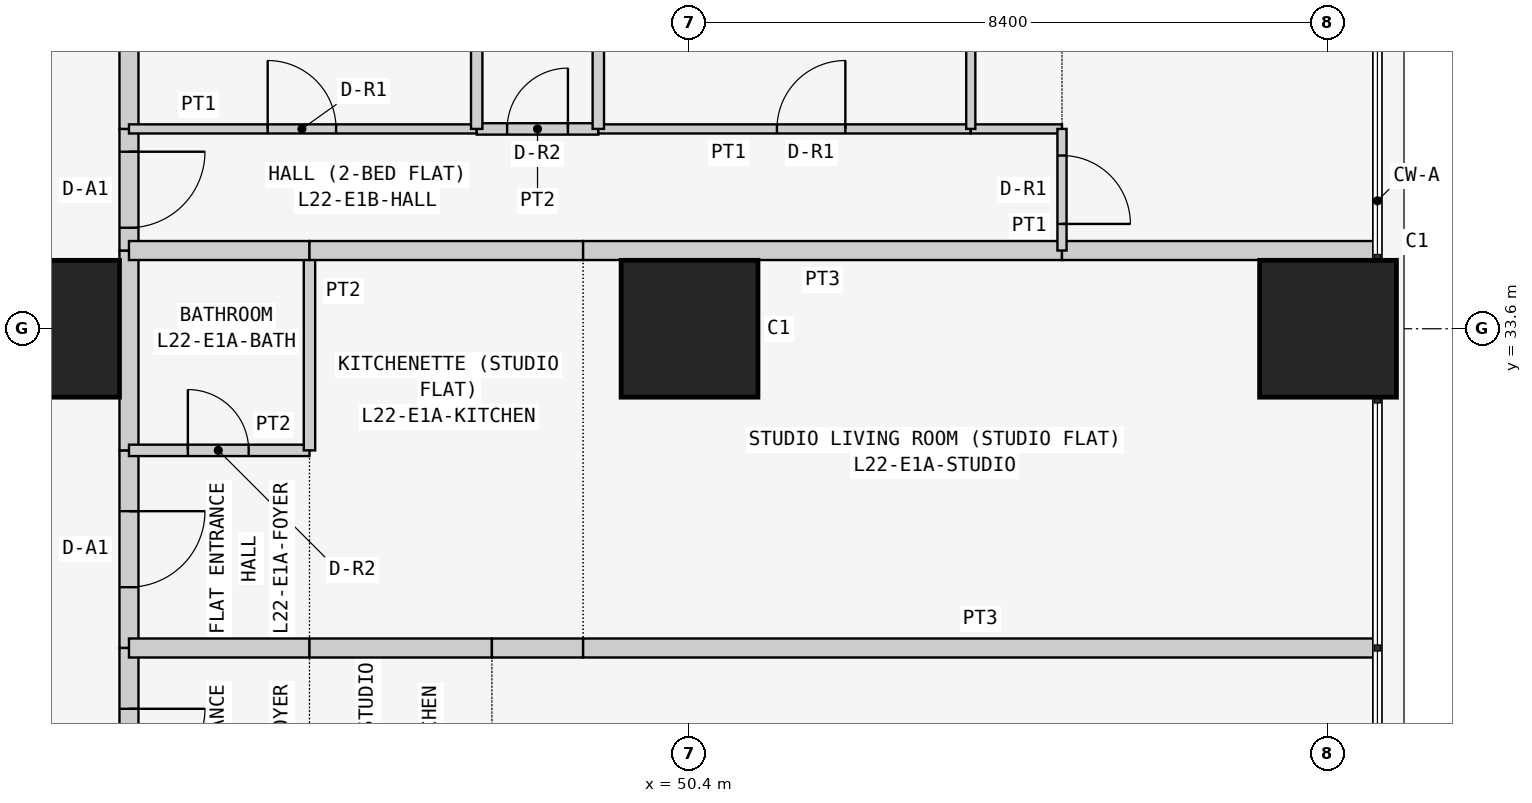
"""IFC4 building model, lengths in metres.
Left out: names, types, materials, properties, quantities, classifications, styles, units other than length and angle.
Written with IfcOpenShell. Run it as: python <this file> out.ifc"""

import sys

from ifc_helpers import new_model, si_unit, direction, frame, frame_2d, origin, origin_2d, place, context, subcontext, project, spatial, rectangle, extrude, element, fill, save


model = new_model("IFC4")
c1 = context("Model", 3, precision=1e-05, world=origin(), true_north=direction((0.0, 1.0)))
c2 = subcontext(c1, "Body", "Model", "MODEL_VIEW")
j1 = project(units=[si_unit("LENGTHUNIT", "METRE"), si_unit("PLANEANGLEUNIT", "RADIAN")], contexts=[c1])
p1 = place(None, origin())
s1 = spatial("IfcSite", under=j1, at=p1, CompositionType="ELEMENT")
p2 = place(p1, origin())
s2 = spatial("IfcBuilding", under=s1, at=p2, CompositionType="ELEMENT")
p3 = place(p2, frame((0.0, 0.0, 88.5)))
s3 = spatial("IfcBuildingStorey", under=s2, at=p3, CompositionType="ELEMENT", Elevation=88.5)
for number, where, z_axis, x_axis in (
    (1, (42.0, 33.6, 0.0), (0.0, 0.0, 1.0), (1.0, 0.0, 0.0)),
    (2, (50.4, 33.6, 0.0), (0.0, 0.0, 1.0), (1.0, 0.0, 0.0)),
    (3, (58.8, 33.6, 0.0), (0.0, 0.0, 1.0), (1.0, 0.0, 0.0)),
):
    element("IfcColumn", number, at=place(p3, frame(where, z_axis=z_axis, x_axis=x_axis)), inside=s3, PredefinedType="COLUMN", context=c2, shape_type="SweptSolid", body=[
        extrude(rectangle(XDim=1.8, YDim=1.8, at=origin_2d()), origin(), (0.0, 0.0, 1.0), 3.6),
    ])
p4 = place(p3, frame((43.025, 32.0, 0.0), z_axis=(0.0, 0.0, 1.0), x_axis=(0.0, -1.0, 0.0)))
e4 = element("IfcWall", 4, at=p4, inside=s3, PredefinedType="PARTITIONING", context=c2, shape_type="SweptSolid", body=[
    extrude(rectangle(XDim=2.6, YDim=0.25, at=frame_2d((1.3, 0.0))), origin(), (0.0, 0.0, 1.0), 3.45),
])
p5 = place(p4, frame((0.8, 0.0, 0.0)))
e5 = element("IfcOpeningElement", 5, at=p5, cuts=e4, PredefinedType="OPENING", context=c2, shape_type="SweptSolid", body=[
    extrude(rectangle(XDim=1.0, YDim=2.1, at=frame_2d((0.5, 1.05))), frame((0.0, 0.135, 0.0), z_axis=(0.0, -1.0, 0.0), x_axis=(1.0, 0.0, 0.0)), (0.0, 0.0, 1.0), 0.27),
])
p6 = place(p3, frame((43.025, 34.629, 0.0), z_axis=(0.0, 0.0, 1.0), x_axis=(0.0, -1.0, 0.0)))
e6 = element("IfcWall", 6, at=p6, inside=s3, PredefinedType="PARTITIONING", context=c2, shape_type="SweptSolid", body=[
    extrude(rectangle(XDim=2.629, YDim=0.25, at=frame_2d((1.314, 0.0))), origin(), (0.0, 0.0, 1.0), 3.45),
])
p7 = place(p3, frame((43.025, 36.229, 0.0), z_axis=(0.0, 0.0, 1.0), x_axis=(0.0, -1.0, 0.0)))
e7 = element("IfcWall", 7, at=p7, inside=s3, PredefinedType="PARTITIONING", context=c2, shape_type="SweptSolid", body=[
    extrude(rectangle(XDim=1.6, YDim=0.25, at=frame_2d((0.8, 0.0))), origin(), (0.0, 0.0, 1.0), 3.45),
])
p8 = place(p7, frame((0.3, 0.0, 0.0)))
e8 = element("IfcOpeningElement", 8, at=p8, cuts=e7, PredefinedType="OPENING", context=c2, shape_type="SweptSolid", body=[
    extrude(rectangle(XDim=1.0, YDim=2.1, at=frame_2d((0.5, 1.05))), frame((0.0, 0.135, 0.0), z_axis=(0.0, -1.0, 0.0), x_axis=(1.0, 0.0, 0.0)), (0.0, 0.0, 1.0), 0.27),
])
p9 = place(p3, frame((43.025, 42.7, 0.0), z_axis=(0.0, 0.0, 1.0), x_axis=(0.0, -1.0, 0.0)))
e9 = element("IfcWall", 9, at=p9, inside=s3, PredefinedType="PARTITIONING", context=c2, shape_type="SweptSolid", body=[
    extrude(rectangle(XDim=6.471, YDim=0.25, at=frame_2d((3.235, 0.0))), origin(), (0.0, 0.0, 1.0), 3.45),
])
p10 = place(p3, frame((43.025, 29.4, 0.0), z_axis=(0.0, 0.0, 1.0), x_axis=(0.0, -1.0, 0.0)))
e10 = element("IfcWall", 10, at=p10, inside=s3, PredefinedType="PARTITIONING", context=c2, shape_type="SweptSolid", body=[
    extrude(rectangle(XDim=2.6, YDim=0.25, at=frame_2d((1.3, 0.0))), origin(), (0.0, 0.0, 1.0), 3.45),
])
p11 = place(p10, frame((0.8, 0.0, 0.0)))
e11 = element("IfcOpeningElement", 11, at=p11, cuts=e10, PredefinedType="OPENING", context=c2, shape_type="SweptSolid", body=[
    extrude(rectangle(XDim=1.0, YDim=2.1, at=frame_2d((0.5, 1.05))), frame((0.0, 0.135, 0.0), z_axis=(0.0, -1.0, 0.0), x_axis=(1.0, 0.0, 0.0)), (0.0, 0.0, 1.0), 0.27),
])
p12 = place(p3, frame((45.4, 32.0, 0.0), z_axis=(0.0, 0.0, 1.0), x_axis=(-1.0, 0.0, 0.0)))
e12 = element("IfcWall", 12, at=p12, inside=s3, PredefinedType="PARTITIONING", context=c2, shape_type="SweptSolid", body=[
    extrude(rectangle(XDim=2.375, YDim=0.15, at=frame_2d((1.188, 0.0))), origin(), (0.0, 0.0, 1.0), 3.45),
])
p13 = place(p12, frame((0.8, 0.0, 0.0)))
e13 = element("IfcOpeningElement", 13, at=p13, cuts=e12, PredefinedType="OPENING", context=c2, shape_type="SweptSolid", body=[
    extrude(rectangle(XDim=0.8, YDim=2.1, at=frame_2d((0.4, 1.05))), frame((0.0, 0.085, 0.0), z_axis=(0.0, -1.0, 0.0), x_axis=(1.0, 0.0, 0.0)), (0.0, 0.0, 1.0), 0.17),
])
p14 = place(p3, frame((43.025, 29.4, 0.0), z_axis=(0.0, 0.0, 1.0), x_axis=(1.0, 0.0, 0.0)))
e14 = element("IfcWall", 14, at=p14, inside=s3, PredefinedType="PARTITIONING", context=c2, shape_type="SweptSolid", body=[
    extrude(rectangle(XDim=2.375, YDim=0.25, at=frame_2d((1.188, 0.0))), origin(), (0.0, 0.0, 1.0), 3.45),
])
p15 = place(p3, frame((45.4, 32.0, 0.0), z_axis=(0.0, 0.0, 1.0), x_axis=(0.0, 1.0, 0.0)))
e15 = element("IfcWall", 15, at=p15, inside=s3, PredefinedType="PARTITIONING", context=c2, shape_type="SweptSolid", body=[
    extrude(rectangle(XDim=2.629, YDim=0.15, at=frame_2d((1.314, 0.0))), origin(), (0.0, 0.0, 1.0), 3.45),
])
p16 = place(p3, frame((45.4, 34.629, 0.0), z_axis=(0.0, 0.0, 1.0), x_axis=(-1.0, 0.0, 0.0)))
e16 = element("IfcWall", 16, at=p16, inside=s3, PredefinedType="PARTITIONING", context=c2, shape_type="SweptSolid", body=[
    extrude(rectangle(XDim=2.375, YDim=0.25, at=frame_2d((1.188, 0.0))), origin(), (0.0, 0.0, 1.0), 3.45),
])
p17 = place(p3, frame((49.0, 34.629, 0.0), z_axis=(0.0, 0.0, 1.0), x_axis=(-1.0, 0.0, 0.0)))
e17 = element("IfcWall", 17, at=p17, inside=s3, PredefinedType="PARTITIONING", context=c2, shape_type="SweptSolid", body=[
    extrude(rectangle(XDim=3.6, YDim=0.25, at=frame_2d((1.8, 0.0))), origin(), (0.0, 0.0, 1.0), 3.45),
])
p18 = place(p3, frame((45.4, 29.4, 0.0), z_axis=(0.0, 0.0, 1.0), x_axis=(1.0, 0.0, 0.0)))
e18 = element("IfcWall", 18, at=p18, inside=s3, PredefinedType="PARTITIONING", context=c2, shape_type="SweptSolid", body=[
    extrude(rectangle(XDim=2.4, YDim=0.25, at=frame_2d((1.2, 0.0))), origin(), (0.0, 0.0, 1.0), 3.45),
])
p19 = place(p3, frame((47.8, 29.4, 0.0), z_axis=(0.0, 0.0, 1.0), x_axis=(1.0, 0.0, 0.0)))
e19 = element("IfcWall", 19, at=p19, inside=s3, PredefinedType="PARTITIONING", context=c2, shape_type="SweptSolid", body=[
    extrude(rectangle(XDim=1.2, YDim=0.25, at=frame_2d((0.6, 0.0))), origin(), (0.0, 0.0, 1.0), 3.45),
])
p20 = place(p3, frame((55.3, 34.629, 0.0), z_axis=(0.0, 0.0, 1.0), x_axis=(-1.0, 0.0, 0.0)))
e20 = element("IfcWall", 20, at=p20, inside=s3, PredefinedType="PARTITIONING", context=c2, shape_type="SweptSolid", body=[
    extrude(rectangle(XDim=6.3, YDim=0.25, at=frame_2d((3.15, 0.0))), origin(), (0.0, 0.0, 1.0), 3.45),
])
p21 = place(p3, frame((59.45, 34.629, 0.0), z_axis=(0.0, 0.0, 1.0), x_axis=(-1.0, 0.0, 0.0)))
e21 = element("IfcWall", 21, at=p21, inside=s3, PredefinedType="PARTITIONING", context=c2, shape_type="SweptSolid", body=[
    extrude(rectangle(XDim=4.15, YDim=0.25, at=frame_2d((2.075, 0.0))), origin(), (0.0, 0.0, 1.0), 3.45),
])
p22 = place(p3, frame((49.0, 29.4, 0.0), z_axis=(0.0, 0.0, 1.0), x_axis=(1.0, 0.0, 0.0)))
e22 = element("IfcWall", 22, at=p22, inside=s3, PredefinedType="PARTITIONING", context=c2, shape_type="SweptSolid", body=[
    extrude(rectangle(XDim=10.45, YDim=0.25, at=frame_2d((5.225, 0.0))), origin(), (0.0, 0.0, 1.0), 3.45),
])
p23 = place(p3, frame((47.6, 36.229, 0.0), z_axis=(0.0, 0.0, 1.0), x_axis=(-1.0, 0.0, 0.0)))
e23 = element("IfcWall", 23, at=p23, inside=s3, PredefinedType="PARTITIONING", context=c2, shape_type="SweptSolid", body=[
    extrude(rectangle(XDim=4.575, YDim=0.12, at=frame_2d((2.288, 0.0))), origin(), (0.0, 0.0, 1.0), 3.45),
])
p24 = place(p23, frame((1.85, 0.0, 0.0)))
e24 = element("IfcOpeningElement", 24, at=p24, cuts=e23, PredefinedType="OPENING", context=c2, shape_type="SweptSolid", body=[
    extrude(rectangle(XDim=0.9, YDim=2.1, at=frame_2d((0.45, 1.05))), frame((0.0, 0.07, 0.0), z_axis=(0.0, -1.0, 0.0), x_axis=(1.0, 0.0, 0.0)), (0.0, 0.0, 1.0), 0.14),
])
p25 = place(p3, frame((49.2, 36.229, 0.0), z_axis=(0.0, 0.0, 1.0), x_axis=(-1.0, 0.0, 0.0)))
e25 = element("IfcWall", 25, at=p25, inside=s3, PredefinedType="PARTITIONING", context=c2, shape_type="SweptSolid", body=[
    extrude(rectangle(XDim=1.6, YDim=0.15, at=frame_2d((0.8, 0.0))), origin(), (0.0, 0.0, 1.0), 3.45),
])
p26 = place(p25, frame((0.4, 0.0, 0.0)))
e26 = element("IfcOpeningElement", 26, at=p26, cuts=e25, PredefinedType="OPENING", context=c2, shape_type="SweptSolid", body=[
    extrude(rectangle(XDim=0.8, YDim=2.1, at=frame_2d((0.4, 1.05))), frame((0.0, 0.085, 0.0), z_axis=(0.0, -1.0, 0.0), x_axis=(1.0, 0.0, 0.0)), (0.0, 0.0, 1.0), 0.17),
])
p27 = place(p3, frame((54.1, 36.229, 0.0), z_axis=(0.0, 0.0, 1.0), x_axis=(-1.0, 0.0, 0.0)))
e27 = element("IfcWall", 27, at=p27, inside=s3, PredefinedType="PARTITIONING", context=c2, shape_type="SweptSolid", body=[
    extrude(rectangle(XDim=4.9, YDim=0.12, at=frame_2d((2.45, 0.0))), origin(), (0.0, 0.0, 1.0), 3.45),
])
p28 = place(p27, frame((1.65, 0.0, 0.0)))
e28 = element("IfcOpeningElement", 28, at=p28, cuts=e27, PredefinedType="OPENING", context=c2, shape_type="SweptSolid", body=[
    extrude(rectangle(XDim=0.9, YDim=2.1, at=frame_2d((0.45, 1.05))), frame((0.0, 0.07, 0.0), z_axis=(0.0, -1.0, 0.0), x_axis=(1.0, 0.0, 0.0)), (0.0, 0.0, 1.0), 0.14),
])
p29 = place(p3, frame((55.3, 36.229, 0.0), z_axis=(0.0, 0.0, 1.0), x_axis=(-1.0, 0.0, 0.0)))
e29 = element("IfcWall", 29, at=p29, inside=s3, PredefinedType="PARTITIONING", context=c2, shape_type="SweptSolid", body=[
    extrude(rectangle(XDim=1.2, YDim=0.12, at=frame_2d((0.6, 0.0))), origin(), (0.0, 0.0, 1.0), 3.45),
])
p30 = place(p3, frame((55.3, 34.629, 0.0), z_axis=(0.0, 0.0, 1.0), x_axis=(0.0, 1.0, 0.0)))
e30 = element("IfcWall", 30, at=p30, inside=s3, PredefinedType="PARTITIONING", context=c2, shape_type="SweptSolid", body=[
    extrude(rectangle(XDim=1.6, YDim=0.12, at=frame_2d((0.8, 0.0))), origin(), (0.0, 0.0, 1.0), 3.45),
])
p31 = place(p30, frame((0.35, 0.0, 0.0)))
e31 = element("IfcOpeningElement", 31, at=p31, cuts=e30, PredefinedType="OPENING", context=c2, shape_type="SweptSolid", body=[
    extrude(rectangle(XDim=0.9, YDim=2.1, at=frame_2d((0.45, 1.05))), frame((0.0, 0.07, 0.0), z_axis=(0.0, -1.0, 0.0), x_axis=(1.0, 0.0, 0.0)), (0.0, 0.0, 1.0), 0.14),
])
for number, where, z_axis, x_axis in (
    (32, (47.6, 36.229, 0.0), (0.0, 0.0, 1.0), (0.0, 1.0, 0.0)),
    (33, (49.2, 36.229, 0.0), (0.0, 0.0, 1.0), (0.0, 1.0, 0.0)),
):
    element("IfcWall", number, at=place(p3, frame(where, z_axis=z_axis, x_axis=x_axis)), inside=s3, PredefinedType="PARTITIONING", context=c2, shape_type="SweptSolid", body=[
        extrude(rectangle(XDim=6.471, YDim=0.15, at=frame_2d((3.235, 0.0))), origin(), (0.0, 0.0, 1.0), 3.45),
    ])
p32 = place(p3, frame((54.1, 36.229, 0.0), z_axis=(0.0, 0.0, 1.0), x_axis=(0.0, 1.0, 0.0)))
e34 = element("IfcWall", 34, at=p32, inside=s3, PredefinedType="PARTITIONING", context=c2, shape_type="SweptSolid", body=[
    extrude(rectangle(XDim=6.471, YDim=0.12, at=frame_2d((3.235, 0.0))), origin(), (0.0, 0.0, 1.0), 3.45),
])
p33 = place(p5, origin())
e35 = element("IfcDoor", 35, at=p33, inside=s3, OperationType="SINGLE_SWING_LEFT", PredefinedType="DOOR", context=c2, shape_type="SweptSolid", body=[
    extrude(rectangle(XDim=1.0, YDim=2.1, at=frame_2d((0.5, 1.05))), frame((0.0, 0.025, 0.0), z_axis=(0.0, -1.0, 0.0), x_axis=(1.0, 0.0, 0.0)), (0.0, 0.0, 1.0), 0.05),
])
fill(e5, e35)
p34 = place(p13, frame((0.8, 0.0, 0.0), z_axis=(0.0, 0.0, 1.0), x_axis=(-1.0, 0.0, 0.0)))
e36 = element("IfcDoor", 36, at=p34, inside=s3, OperationType="SINGLE_SWING_LEFT", PredefinedType="DOOR", context=c2, shape_type="SweptSolid", body=[
    extrude(rectangle(XDim=0.8, YDim=2.1, at=frame_2d((0.4, 1.05))), frame((0.0, 0.025, 0.0), z_axis=(0.0, -1.0, 0.0), x_axis=(1.0, 0.0, 0.0)), (0.0, 0.0, 1.0), 0.05),
])
fill(e13, e36)
p35 = place(p8, origin())
e37 = element("IfcDoor", 37, at=p35, inside=s3, OperationType="SINGLE_SWING_LEFT", PredefinedType="DOOR", context=c2, shape_type="SweptSolid", body=[
    extrude(rectangle(XDim=1.0, YDim=2.1, at=frame_2d((0.5, 1.05))), frame((0.0, 0.025, 0.0), z_axis=(0.0, -1.0, 0.0), x_axis=(1.0, 0.0, 0.0)), (0.0, 0.0, 1.0), 0.05),
])
fill(e8, e37)
p36 = place(p24, frame((0.9, 0.0, 0.0), z_axis=(0.0, 0.0, 1.0), x_axis=(-1.0, 0.0, 0.0)))
e38 = element("IfcDoor", 38, at=p36, inside=s3, OperationType="SINGLE_SWING_LEFT", PredefinedType="DOOR", context=c2, shape_type="SweptSolid", body=[
    extrude(rectangle(XDim=0.9, YDim=2.1, at=frame_2d((0.45, 1.05))), frame((0.0, 0.025, 0.0), z_axis=(0.0, -1.0, 0.0), x_axis=(1.0, 0.0, 0.0)), (0.0, 0.0, 1.0), 0.05),
])
fill(e24, e38)
p37 = place(p26, frame((0.8, 0.0, 0.0), z_axis=(0.0, 0.0, 1.0), x_axis=(-1.0, 0.0, 0.0)))
e39 = element("IfcDoor", 39, at=p37, inside=s3, OperationType="SINGLE_SWING_RIGHT", PredefinedType="DOOR", context=c2, shape_type="SweptSolid", body=[
    extrude(rectangle(XDim=0.8, YDim=2.1, at=frame_2d((0.4, 1.05))), frame((0.0, 0.025, 0.0), z_axis=(0.0, -1.0, 0.0), x_axis=(1.0, 0.0, 0.0)), (0.0, 0.0, 1.0), 0.05),
])
fill(e26, e39)
p38 = place(p28, frame((0.9, 0.0, 0.0), z_axis=(0.0, 0.0, 1.0), x_axis=(-1.0, 0.0, 0.0)))
e40 = element("IfcDoor", 40, at=p38, inside=s3, OperationType="SINGLE_SWING_RIGHT", PredefinedType="DOOR", context=c2, shape_type="SweptSolid", body=[
    extrude(rectangle(XDim=0.9, YDim=2.1, at=frame_2d((0.45, 1.05))), frame((0.0, 0.025, 0.0), z_axis=(0.0, -1.0, 0.0), x_axis=(1.0, 0.0, 0.0)), (0.0, 0.0, 1.0), 0.05),
])
fill(e28, e40)
p39 = place(p31, frame((0.9, 0.0, 0.0), z_axis=(0.0, 0.0, 1.0), x_axis=(-1.0, 0.0, 0.0)))
e41 = element("IfcDoor", 41, at=p39, inside=s3, OperationType="SINGLE_SWING_RIGHT", PredefinedType="DOOR", context=c2, shape_type="SweptSolid", body=[
    extrude(rectangle(XDim=0.9, YDim=2.1, at=frame_2d((0.45, 1.05))), frame((0.0, 0.025, 0.0), z_axis=(0.0, -1.0, 0.0), x_axis=(1.0, 0.0, 0.0)), (0.0, 0.0, 1.0), 0.05),
])
fill(e31, e41)
p40 = place(p11, origin())
e42 = element("IfcDoor", 42, at=p40, inside=s3, OperationType="SINGLE_SWING_LEFT", PredefinedType="DOOR", context=c2, shape_type="SweptSolid", body=[
    extrude(rectangle(XDim=1.0, YDim=2.1, at=frame_2d((0.5, 1.05))), frame((0.0, 0.025, 0.0), z_axis=(0.0, -1.0, 0.0), x_axis=(1.0, 0.0, 0.0)), (0.0, 0.0, 1.0), 0.05),
])
fill(e11, e42)
save(model, sys.argv[1])
